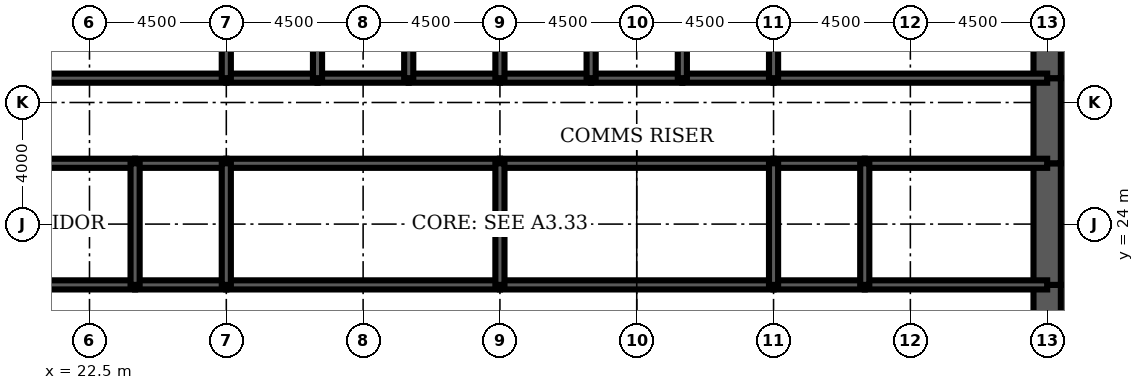
"""IFC4 building model, lengths in metres.
Left out: names, types, materials, properties, quantities, classifications, styles, units other than length and angle.
Written with IfcOpenShell. Run it as: python <this file> out.ifc"""

import sys

from ifc_helpers import new_model, si_unit, direction, frame, frame_2d, origin, place, context, subcontext, project, spatial, rectangle, extrude, element, fill, save


model = new_model("IFC4")
c1 = context("Model", 3, precision=1e-05, world=origin(), true_north=direction((0.0, 1.0)))
c2 = subcontext(c1, "Body", "Model", "MODEL_VIEW")
j1 = project(units=[si_unit("LENGTHUNIT", "METRE"), si_unit("PLANEANGLEUNIT", "RADIAN")], contexts=[c1])
p1 = place(None, origin())
s1 = spatial("IfcSite", under=j1, at=p1, CompositionType="ELEMENT")
p2 = place(p1, origin())
s2 = spatial("IfcBuilding", under=s1, at=p2, CompositionType="ELEMENT")
p3 = place(p2, frame((0.0, 0.0, 142.5)))
s3 = spatial("IfcBuildingStorey", under=s2, at=p3, CompositionType="ELEMENT", Elevation=142.5)
p4 = place(p3, frame((54.0, 19.2, 0.0), z_axis=(0.0, 0.0, 1.0), x_axis=(0.0, 1.0, 0.0)))
e1 = element("IfcWall", 1, at=p4, inside=s3, PredefinedType="SHEAR", context=c2, shape_type="SweptSolid", body=[
    extrude(rectangle(XDim=2.8, YDim=0.9, at=frame_2d((1.4, 0.0))), origin(), (0.0, 0.0, 1.0), 4.2),
])
p5 = place(p4, frame((0.4, 0.0, 0.0)))
e2 = element("IfcOpeningElement", 2, at=p5, cuts=e1, PredefinedType="OPENING", context=c2, shape_type="SweptSolid", body=[
    extrude(rectangle(XDim=1.8, YDim=2.1, at=frame_2d((0.9, 1.05))), frame((0.0, 0.46, 0.0), z_axis=(0.0, -1.0, 0.0), x_axis=(1.0, 0.0, 0.0)), (0.0, 0.0, 1.0), 0.92),
])
p6 = place(p3, frame((54.0, 22.0, 0.0), z_axis=(0.0, 0.0, 1.0), x_axis=(0.0, 1.0, 0.0)))
e3 = element("IfcWall", 3, at=p6, inside=s3, PredefinedType="SHEAR", context=c2, shape_type="SweptSolid", body=[
    extrude(rectangle(XDim=4.0, YDim=0.9, at=frame_2d((2.0, 0.0))), origin(), (0.0, 0.0, 1.0), 4.2),
])
p7 = place(p3, frame((54.0, 26.0, 0.0), z_axis=(0.0, 0.0, 1.0), x_axis=(0.0, 1.0, 0.0)))
e4 = element("IfcWall", 4, at=p7, inside=s3, PredefinedType="SHEAR", context=c2, shape_type="SweptSolid", body=[
    extrude(rectangle(XDim=2.8, YDim=0.9, at=frame_2d((1.4, 0.0))), origin(), (0.0, 0.0, 1.0), 4.2),
])
p8 = place(p7, frame((0.6, 0.0, 0.0)))
e5 = element("IfcOpeningElement", 5, at=p8, cuts=e4, PredefinedType="OPENING", context=c2, shape_type="SweptSolid", body=[
    extrude(rectangle(XDim=1.8, YDim=2.1, at=frame_2d((0.9, 1.05))), frame((0.0, 0.46, 0.0), z_axis=(0.0, -1.0, 0.0), x_axis=(1.0, 0.0, 0.0)), (0.0, 0.0, 1.0), 0.92),
])
p9 = place(p3, frame((54.0, 28.8, 0.0), z_axis=(0.0, 0.0, 1.0), x_axis=(0.0, 1.0, 0.0)))
e6 = element("IfcWall", 6, at=p9, inside=s3, PredefinedType="SHEAR", context=c2, shape_type="SweptSolid", body=[
    extrude(rectangle(XDim=3.2, YDim=0.9, at=frame_2d((1.6, 0.0))), origin(), (0.0, 0.0, 1.0), 4.2),
])
p10 = place(p3, frame((18.0, 28.8, 0.0), z_axis=(0.0, 0.0, 1.0), x_axis=(1.0, 0.0, 0.0)))
e7 = element("IfcWall", 7, at=p10, inside=s3, PredefinedType="SOLIDWALL", context=c2, shape_type="SweptSolid", body=[
    extrude(rectangle(XDim=9.0, YDim=0.3, at=frame_2d((4.5, 0.0))), origin(), (0.0, 0.0, 1.0), 4.2),
])
p11 = place(p10, frame((0.65, 0.0, 0.0)))
e8 = element("IfcOpeningElement", 8, at=p11, cuts=e7, PredefinedType="OPENING", context=c2, shape_type="SweptSolid", body=[
    extrude(rectangle(XDim=1.0, YDim=2.1, at=frame_2d((0.5, 1.05))), frame((0.0, 0.16, 0.0), z_axis=(0.0, -1.0, 0.0), x_axis=(1.0, 0.0, 0.0)), (0.0, 0.0, 1.0), 0.32),
])
p12 = place(p3, frame((27.0, 28.8, 0.0), z_axis=(0.0, 0.0, 1.0), x_axis=(1.0, 0.0, 0.0)))
e9 = element("IfcWall", 9, at=p12, inside=s3, PredefinedType="SOLIDWALL", context=c2, shape_type="SweptSolid", body=[
    extrude(rectangle(XDim=3.0, YDim=0.3, at=frame_2d((1.5, 0.0))), origin(), (0.0, 0.0, 1.0), 4.2),
])
p13 = place(p12, frame((0.95, 0.0, 0.0)))
e10 = element("IfcOpeningElement", 10, at=p13, cuts=e9, PredefinedType="OPENING", context=c2, shape_type="SweptSolid", body=[
    extrude(rectangle(XDim=1.1, YDim=2.2, at=frame_2d((0.55, 1.1))), frame((0.0, 0.16, 0.0), z_axis=(0.0, -1.0, 0.0), x_axis=(1.0, 0.0, 0.0)), (0.0, 0.0, 1.0), 0.32),
])
p14 = place(p3, frame((30.0, 28.8, 0.0), z_axis=(0.0, 0.0, 1.0), x_axis=(1.0, 0.0, 0.0)))
e11 = element("IfcWall", 11, at=p14, inside=s3, PredefinedType="SOLIDWALL", context=c2, shape_type="SweptSolid", body=[
    extrude(rectangle(XDim=3.0, YDim=0.3, at=frame_2d((1.5, 0.0))), origin(), (0.0, 0.0, 1.0), 4.2),
])
p15 = place(p14, frame((0.95, 0.0, 0.0)))
e12 = element("IfcOpeningElement", 12, at=p15, cuts=e11, PredefinedType="OPENING", context=c2, shape_type="SweptSolid", body=[
    extrude(rectangle(XDim=1.1, YDim=2.2, at=frame_2d((0.55, 1.1))), frame((0.0, 0.16, 0.0), z_axis=(0.0, -1.0, 0.0), x_axis=(1.0, 0.0, 0.0)), (0.0, 0.0, 1.0), 0.32),
])
p16 = place(p3, frame((33.0, 28.8, 0.0), z_axis=(0.0, 0.0, 1.0), x_axis=(1.0, 0.0, 0.0)))
e13 = element("IfcWall", 13, at=p16, inside=s3, PredefinedType="SOLIDWALL", context=c2, shape_type="SweptSolid", body=[
    extrude(rectangle(XDim=3.0, YDim=0.3, at=frame_2d((1.5, 0.0))), origin(), (0.0, 0.0, 1.0), 4.2),
])
p17 = place(p16, frame((0.95, 0.0, 0.0)))
e14 = element("IfcOpeningElement", 14, at=p17, cuts=e13, PredefinedType="OPENING", context=c2, shape_type="SweptSolid", body=[
    extrude(rectangle(XDim=1.1, YDim=2.2, at=frame_2d((0.55, 1.1))), frame((0.0, 0.16, 0.0), z_axis=(0.0, -1.0, 0.0), x_axis=(1.0, 0.0, 0.0)), (0.0, 0.0, 1.0), 0.32),
])
for number, where, z_axis, x_axis in (
    (15, (36.0, 28.8, 0.0), (0.0, 0.0, 1.0), (1.0, 0.0, 0.0)),
    (16, (39.0, 28.8, 0.0), (0.0, 0.0, 1.0), (1.0, 0.0, 0.0)),
):
    element("IfcWall", number, at=place(p3, frame(where, z_axis=z_axis, x_axis=x_axis)), inside=s3, PredefinedType="SOLIDWALL", context=c2, shape_type="SweptSolid", body=[
        extrude(rectangle(XDim=3.0, YDim=0.3, at=frame_2d((1.5, 0.0))), origin(), (0.0, 0.0, 1.0), 4.2),
    ])
p18 = place(p3, frame((42.0, 28.8, 0.0), z_axis=(0.0, 0.0, 1.0), x_axis=(1.0, 0.0, 0.0)))
e17 = element("IfcWall", 17, at=p18, inside=s3, PredefinedType="SOLIDWALL", context=c2, shape_type="SweptSolid", body=[
    extrude(rectangle(XDim=3.0, YDim=0.3, at=frame_2d((1.5, 0.0))), origin(), (0.0, 0.0, 1.0), 4.2),
])
p19 = place(p18, frame((0.95, 0.0, 0.0)))
e18 = element("IfcOpeningElement", 18, at=p19, cuts=e17, PredefinedType="OPENING", context=c2, shape_type="SweptSolid", body=[
    extrude(rectangle(XDim=1.1, YDim=2.2, at=frame_2d((0.55, 1.1))), frame((0.0, 0.16, 0.0), z_axis=(0.0, -1.0, 0.0), x_axis=(1.0, 0.0, 0.0)), (0.0, 0.0, 1.0), 0.32),
])
p20 = place(p3, frame((45.0, 28.8, 0.0), z_axis=(0.0, 0.0, 1.0), x_axis=(1.0, 0.0, 0.0)))
e19 = element("IfcWall", 19, at=p20, inside=s3, PredefinedType="SOLIDWALL", context=c2, shape_type="SweptSolid", body=[
    extrude(rectangle(XDim=9.0, YDim=0.3, at=frame_2d((4.5, 0.0))), origin(), (0.0, 0.0, 1.0), 4.2),
])
p21 = place(p20, frame((7.35, 0.0, 0.0)))
e20 = element("IfcOpeningElement", 20, at=p21, cuts=e19, PredefinedType="OPENING", context=c2, shape_type="SweptSolid", body=[
    extrude(rectangle(XDim=1.0, YDim=2.1, at=frame_2d((0.5, 1.05))), frame((0.0, 0.16, 0.0), z_axis=(0.0, -1.0, 0.0), x_axis=(1.0, 0.0, 0.0)), (0.0, 0.0, 1.0), 0.32),
])
p22 = place(p3, frame((18.0, 22.0, 0.0), z_axis=(0.0, 0.0, 1.0), x_axis=(1.0, 0.0, 0.0)))
e21 = element("IfcWall", 21, at=p22, inside=s3, PredefinedType="SOLIDWALL", context=c2, shape_type="SweptSolid", body=[
    extrude(rectangle(XDim=6.0, YDim=0.3, at=frame_2d((3.0, 0.0))), origin(), (0.0, 0.0, 1.0), 4.2),
])
p23 = place(p22, frame((2.0, 0.0, 0.0)))
e22 = element("IfcOpeningElement", 22, at=p23, cuts=e21, PredefinedType="OPENING", context=c2, shape_type="SweptSolid", body=[
    extrude(rectangle(XDim=1.0, YDim=2.1, at=frame_2d((0.5, 1.05))), frame((0.0, 0.16, 0.0), z_axis=(0.0, -1.0, 0.0), x_axis=(1.0, 0.0, 0.0)), (0.0, 0.0, 1.0), 0.32),
])
p24 = place(p3, frame((24.0, 22.0, 0.0), z_axis=(0.0, 0.0, 1.0), x_axis=(1.0, 0.0, 0.0)))
e23 = element("IfcWall", 23, at=p24, inside=s3, PredefinedType="SOLIDWALL", context=c2, shape_type="SweptSolid", body=[
    extrude(rectangle(XDim=3.0, YDim=0.3, at=frame_2d((1.5, 0.0))), origin(), (0.0, 0.0, 1.0), 4.2),
])
p25 = place(p24, frame((1.0, 0.0, 0.0)))
e24 = element("IfcOpeningElement", 24, at=p25, cuts=e23, PredefinedType="OPENING", context=c2, shape_type="SweptSolid", body=[
    extrude(rectangle(XDim=1.0, YDim=2.1, at=frame_2d((0.5, 1.05))), frame((0.0, 0.16, 0.0), z_axis=(0.0, -1.0, 0.0), x_axis=(1.0, 0.0, 0.0)), (0.0, 0.0, 1.0), 0.32),
])
p26 = place(p3, frame((27.0, 22.0, 0.0), z_axis=(0.0, 0.0, 1.0), x_axis=(1.0, 0.0, 0.0)))
e25 = element("IfcWall", 25, at=p26, inside=s3, PredefinedType="SOLIDWALL", context=c2, shape_type="SweptSolid", body=[
    extrude(rectangle(XDim=9.0, YDim=0.3, at=frame_2d((4.5, 0.0))), origin(), (0.0, 0.0, 1.0), 4.2),
])
p27 = place(p26, frame((4.0, 0.0, 0.0)))
e26 = element("IfcOpeningElement", 26, at=p27, cuts=e25, PredefinedType="OPENING", context=c2, shape_type="SweptSolid", body=[
    extrude(rectangle(XDim=1.0, YDim=2.1, at=frame_2d((0.5, 1.05))), frame((0.0, 0.16, 0.0), z_axis=(0.0, -1.0, 0.0), x_axis=(1.0, 0.0, 0.0)), (0.0, 0.0, 1.0), 0.32),
])
p28 = place(p3, frame((36.0, 22.0, 0.0), z_axis=(0.0, 0.0, 1.0), x_axis=(1.0, 0.0, 0.0)))
e27 = element("IfcWall", 27, at=p28, inside=s3, PredefinedType="SOLIDWALL", context=c2, shape_type="SweptSolid", body=[
    extrude(rectangle(XDim=9.0, YDim=0.3, at=frame_2d((4.5, 0.0))), origin(), (0.0, 0.0, 1.0), 4.2),
])
p29 = place(p28, frame((4.0, 0.0, 0.0)))
e28 = element("IfcOpeningElement", 28, at=p29, cuts=e27, PredefinedType="OPENING", context=c2, shape_type="SweptSolid", body=[
    extrude(rectangle(XDim=1.0, YDim=2.1, at=frame_2d((0.5, 1.05))), frame((0.0, 0.16, 0.0), z_axis=(0.0, -1.0, 0.0), x_axis=(1.0, 0.0, 0.0)), (0.0, 0.0, 1.0), 0.32),
])
p30 = place(p3, frame((45.0, 22.0, 0.0), z_axis=(0.0, 0.0, 1.0), x_axis=(1.0, 0.0, 0.0)))
e29 = element("IfcWall", 29, at=p30, inside=s3, PredefinedType="SOLIDWALL", context=c2, shape_type="SweptSolid", body=[
    extrude(rectangle(XDim=3.0, YDim=0.3, at=frame_2d((1.5, 0.0))), origin(), (0.0, 0.0, 1.0), 4.2),
])
p31 = place(p30, frame((1.0, 0.0, 0.0)))
e30 = element("IfcOpeningElement", 30, at=p31, cuts=e29, PredefinedType="OPENING", context=c2, shape_type="SweptSolid", body=[
    extrude(rectangle(XDim=1.0, YDim=2.1, at=frame_2d((0.5, 1.05))), frame((0.0, 0.16, 0.0), z_axis=(0.0, -1.0, 0.0), x_axis=(1.0, 0.0, 0.0)), (0.0, 0.0, 1.0), 0.32),
])
p32 = place(p3, frame((48.0, 22.0, 0.0), z_axis=(0.0, 0.0, 1.0), x_axis=(1.0, 0.0, 0.0)))
e31 = element("IfcWall", 31, at=p32, inside=s3, PredefinedType="SOLIDWALL", context=c2, shape_type="SweptSolid", body=[
    extrude(rectangle(XDim=6.0, YDim=0.3, at=frame_2d((3.0, 0.0))), origin(), (0.0, 0.0, 1.0), 4.2),
])
p33 = place(p32, frame((2.0, 0.0, 0.0)))
e32 = element("IfcOpeningElement", 32, at=p33, cuts=e31, PredefinedType="OPENING", context=c2, shape_type="SweptSolid", body=[
    extrude(rectangle(XDim=1.0, YDim=2.1, at=frame_2d((0.5, 1.05))), frame((0.0, 0.16, 0.0), z_axis=(0.0, -1.0, 0.0), x_axis=(1.0, 0.0, 0.0)), (0.0, 0.0, 1.0), 0.32),
])
p34 = place(p32, frame((4.3, 0.0, 0.0)))
e33 = element("IfcOpeningElement", 33, at=p34, cuts=e31, PredefinedType="OPENING", context=c2, shape_type="SweptSolid", body=[
    extrude(rectangle(XDim=1.0, YDim=2.1, at=frame_2d((0.5, 1.05))), frame((0.0, 0.16, 0.0), z_axis=(0.0, -1.0, 0.0), x_axis=(1.0, 0.0, 0.0)), (0.0, 0.0, 1.0), 0.32),
])
p35 = place(p3, frame((18.0, 26.0, 0.0), z_axis=(0.0, 0.0, 1.0), x_axis=(1.0, 0.0, 0.0)))
e34 = element("IfcWall", 34, at=p35, inside=s3, PredefinedType="SOLIDWALL", context=c2, shape_type="SweptSolid", body=[
    extrude(rectangle(XDim=6.0, YDim=0.3, at=frame_2d((3.0, 0.0))), origin(), (0.0, 0.0, 1.0), 4.2),
])
p36 = place(p3, frame((24.0, 26.0, 0.0), z_axis=(0.0, 0.0, 1.0), x_axis=(1.0, 0.0, 0.0)))
e35 = element("IfcWall", 35, at=p36, inside=s3, PredefinedType="SOLIDWALL", context=c2, shape_type="SweptSolid", body=[
    extrude(rectangle(XDim=3.0, YDim=0.3, at=frame_2d((1.5, 0.0))), origin(), (0.0, 0.0, 1.0), 4.2),
])
for number, where, z_axis, x_axis in (
    (36, (27.0, 26.0, 0.0), (0.0, 0.0, 1.0), (1.0, 0.0, 0.0)),
    (37, (36.0, 26.0, 0.0), (0.0, 0.0, 1.0), (1.0, 0.0, 0.0)),
):
    element("IfcWall", number, at=place(p3, frame(where, z_axis=z_axis, x_axis=x_axis)), inside=s3, PredefinedType="SOLIDWALL", context=c2, shape_type="SweptSolid", body=[
        extrude(rectangle(XDim=9.0, YDim=0.3, at=frame_2d((4.5, 0.0))), origin(), (0.0, 0.0, 1.0), 4.2),
    ])
p37 = place(p3, frame((45.0, 26.0, 0.0), z_axis=(0.0, 0.0, 1.0), x_axis=(1.0, 0.0, 0.0)))
e38 = element("IfcWall", 38, at=p37, inside=s3, PredefinedType="SOLIDWALL", context=c2, shape_type="SweptSolid", body=[
    extrude(rectangle(XDim=3.0, YDim=0.3, at=frame_2d((1.5, 0.0))), origin(), (0.0, 0.0, 1.0), 4.2),
])
p38 = place(p3, frame((48.0, 26.0, 0.0), z_axis=(0.0, 0.0, 1.0), x_axis=(1.0, 0.0, 0.0)))
e39 = element("IfcWall", 39, at=p38, inside=s3, PredefinedType="SOLIDWALL", context=c2, shape_type="SweptSolid", body=[
    extrude(rectangle(XDim=6.0, YDim=0.3, at=frame_2d((3.0, 0.0))), origin(), (0.0, 0.0, 1.0), 4.2),
])
for number, where, z_axis, x_axis in (
    (40, (27.0, 28.8, 0.0), (0.0, 0.0, 1.0), (0.0, 1.0, 0.0)),
    (41, (30.0, 28.8, 0.0), (0.0, 0.0, 1.0), (0.0, 1.0, 0.0)),
    (42, (33.0, 28.8, 0.0), (0.0, 0.0, 1.0), (0.0, 1.0, 0.0)),
    (43, (36.0, 28.8, 0.0), (0.0, 0.0, 1.0), (0.0, 1.0, 0.0)),
    (44, (39.0, 28.8, 0.0), (0.0, 0.0, 1.0), (0.0, 1.0, 0.0)),
    (45, (42.0, 28.8, 0.0), (0.0, 0.0, 1.0), (0.0, 1.0, 0.0)),
    (46, (45.0, 28.8, 0.0), (0.0, 0.0, 1.0), (0.0, 1.0, 0.0)),
):
    element("IfcWall", number, at=place(p3, frame(where, z_axis=z_axis, x_axis=x_axis)), inside=s3, PredefinedType="SOLIDWALL", context=c2, shape_type="SweptSolid", body=[
        extrude(rectangle(XDim=3.2, YDim=0.3, at=frame_2d((1.6, 0.0))), origin(), (0.0, 0.0, 1.0), 4.2),
    ])
for number, where, z_axis, x_axis in (
    (47, (24.0, 22.0, 0.0), (0.0, 0.0, 1.0), (0.0, 1.0, 0.0)),
    (48, (27.0, 22.0, 0.0), (0.0, 0.0, 1.0), (0.0, 1.0, 0.0)),
    (49, (36.0, 22.0, 0.0), (0.0, 0.0, 1.0), (0.0, 1.0, 0.0)),
    (50, (45.0, 22.0, 0.0), (0.0, 0.0, 1.0), (0.0, 1.0, 0.0)),
    (51, (48.0, 22.0, 0.0), (0.0, 0.0, 1.0), (0.0, 1.0, 0.0)),
):
    element("IfcWall", number, at=place(p3, frame(where, z_axis=z_axis, x_axis=x_axis)), inside=s3, PredefinedType="SOLIDWALL", context=c2, shape_type="SweptSolid", body=[
        extrude(rectangle(XDim=4.0, YDim=0.3, at=frame_2d((2.0, 0.0))), origin(), (0.0, 0.0, 1.0), 4.2),
    ])
p39 = place(p3, frame((38.5, 22.15, 0.0), z_axis=(0.0, 0.0, 1.0), x_axis=(0.0, 1.0, 0.0)))
e52 = element("IfcWall", 52, at=p39, inside=s3, PredefinedType="PARTITIONING", context=c2, shape_type="SweptSolid", body=[
    extrude(rectangle(XDim=3.7, YDim=0.15, at=frame_2d((1.85, 0.0))), origin(), (0.0, 0.0, 1.0), 3.0),
])
p40 = place(p39, frame((2.2, 0.0, 0.0)))
e53 = element("IfcOpeningElement", 53, at=p40, cuts=e52, PredefinedType="OPENING", context=c2, shape_type="SweptSolid", body=[
    extrude(rectangle(XDim=1.0, YDim=2.1, at=frame_2d((0.5, 1.05))), frame((0.0, 0.085, 0.0), z_axis=(0.0, -1.0, 0.0), x_axis=(1.0, 0.0, 0.0)), (0.0, 0.0, 1.0), 0.17),
])
p41 = place(p3, frame((51.975, 22.15, 0.0), z_axis=(0.0, 0.0, 1.0), x_axis=(0.0, 1.0, 0.0)))
e54 = element("IfcWall", 54, at=p41, inside=s3, PredefinedType="PARTITIONING", context=c2, shape_type="SweptSolid", body=[
    extrude(rectangle(XDim=3.7, YDim=0.15, at=frame_2d((1.85, 0.0))), origin(), (0.0, 0.0, 1.0), 3.0),
])
p42 = place(p3, frame((22.2, 26.15, 0.0), z_axis=(0.0, 0.0, 1.0), x_axis=(0.0, 1.0, 0.0)))
e55 = element("IfcWall", 55, at=p42, inside=s3, PredefinedType="PARTITIONING", context=c2, shape_type="SweptSolid", body=[
    extrude(rectangle(XDim=2.5, YDim=0.15, at=frame_2d((1.25, 0.0))), origin(), (0.0, 0.0, 1.0), 3.0),
])
p43 = place(p42, frame((0.35, 0.0, 0.0)))
e56 = element("IfcOpeningElement", 56, at=p43, cuts=e55, PredefinedType="OPENING", context=c2, shape_type="SweptSolid", body=[
    extrude(rectangle(XDim=1.0, YDim=2.1, at=frame_2d((0.5, 1.05))), frame((0.0, 0.085, 0.0), z_axis=(0.0, -1.0, 0.0), x_axis=(1.0, 0.0, 0.0)), (0.0, 0.0, 1.0), 0.17),
])
p44 = place(p40, origin())
e57 = element("IfcDoor", 57, at=p44, inside=s3, OperationType="SINGLE_SWING_RIGHT", PredefinedType="DOOR", context=c2, shape_type="SweptSolid", body=[
    extrude(rectangle(XDim=1.0, YDim=2.1, at=frame_2d((0.5, 1.05))), frame((0.0, 0.025, 0.0), z_axis=(0.0, -1.0, 0.0), x_axis=(1.0, 0.0, 0.0)), (0.0, 0.0, 1.0), 0.05),
])
fill(e53, e57)
p45 = place(p43, origin())
e58 = element("IfcDoor", 58, at=p45, inside=s3, OperationType="SINGLE_SWING_LEFT", PredefinedType="DOOR", context=c2, shape_type="SweptSolid", body=[
    extrude(rectangle(XDim=1.0, YDim=2.1, at=frame_2d((0.5, 1.05))), frame((0.0, 0.025, 0.0), z_axis=(0.0, -1.0, 0.0), x_axis=(1.0, 0.0, 0.0)), (0.0, 0.0, 1.0), 0.05),
])
fill(e56, e58)
p46 = place(p19, origin())
e59 = element("IfcDoor", 59, at=p46, inside=s3, OperationType="DOUBLE_DOOR_SLIDING", PredefinedType="USERDEFINED", context=c2, shape_type="SweptSolid", body=[
    extrude(rectangle(XDim=1.1, YDim=2.2, at=frame_2d((0.55, 1.1))), frame((0.0, 0.025, 0.0), z_axis=(0.0, -1.0, 0.0), x_axis=(1.0, 0.0, 0.0)), (0.0, 0.0, 1.0), 0.05),
])
fill(e18, e59)
p47 = place(p13, origin())
e60 = element("IfcDoor", 60, at=p47, inside=s3, OperationType="DOUBLE_DOOR_SLIDING", PredefinedType="USERDEFINED", context=c2, shape_type="SweptSolid", body=[
    extrude(rectangle(XDim=1.1, YDim=2.2, at=frame_2d((0.55, 1.1))), frame((0.0, 0.025, 0.0), z_axis=(0.0, -1.0, 0.0), x_axis=(1.0, 0.0, 0.0)), (0.0, 0.0, 1.0), 0.05),
])
fill(e10, e60)
p48 = place(p15, origin())
e61 = element("IfcDoor", 61, at=p48, inside=s3, OperationType="DOUBLE_DOOR_SLIDING", PredefinedType="USERDEFINED", context=c2, shape_type="SweptSolid", body=[
    extrude(rectangle(XDim=1.1, YDim=2.2, at=frame_2d((0.55, 1.1))), frame((0.0, 0.025, 0.0), z_axis=(0.0, -1.0, 0.0), x_axis=(1.0, 0.0, 0.0)), (0.0, 0.0, 1.0), 0.05),
])
fill(e12, e61)
p49 = place(p17, origin())
e62 = element("IfcDoor", 62, at=p49, inside=s3, OperationType="DOUBLE_DOOR_SLIDING", PredefinedType="USERDEFINED", context=c2, shape_type="SweptSolid", body=[
    extrude(rectangle(XDim=1.1, YDim=2.2, at=frame_2d((0.55, 1.1))), frame((0.0, 0.025, 0.0), z_axis=(0.0, -1.0, 0.0), x_axis=(1.0, 0.0, 0.0)), (0.0, 0.0, 1.0), 0.05),
])
fill(e14, e62)
p50 = place(p21, origin())
e63 = element("IfcDoor", 63, at=p50, inside=s3, OperationType="SINGLE_SWING_RIGHT", PredefinedType="DOOR", context=c2, shape_type="SweptSolid", body=[
    extrude(rectangle(XDim=1.0, YDim=2.1, at=frame_2d((0.5, 1.05))), frame((0.0, 0.025, 0.0), z_axis=(0.0, -1.0, 0.0), x_axis=(1.0, 0.0, 0.0)), (0.0, 0.0, 1.0), 0.05),
])
fill(e20, e63)
p51 = place(p5, origin())
e64 = element("IfcDoor", 64, at=p51, inside=s3, OperationType="SINGLE_SWING_LEFT", PredefinedType="DOOR", context=c2, shape_type="SweptSolid", body=[
    extrude(rectangle(XDim=1.8, YDim=2.1, at=frame_2d((0.9, 1.05))), frame((0.0, 0.45, 0.0), z_axis=(0.0, -1.0, 0.0), x_axis=(1.0, 0.0, 0.0)), (0.0, 0.0, 1.0), 0.899),
])
fill(e2, e64)
p52 = place(p8, origin())
e65 = element("IfcDoor", 65, at=p52, inside=s3, OperationType="SINGLE_SWING_LEFT", PredefinedType="DOOR", context=c2, shape_type="SweptSolid", body=[
    extrude(rectangle(XDim=1.8, YDim=2.1, at=frame_2d((0.9, 1.05))), frame((0.0, 0.45, 0.0), z_axis=(0.0, -1.0, 0.0), x_axis=(1.0, 0.0, 0.0)), (0.0, 0.0, 1.0), 0.899),
])
fill(e5, e65)
p53 = place(p25, origin())
e66 = element("IfcDoor", 66, at=p53, inside=s3, OperationType="SINGLE_SWING_LEFT", PredefinedType="DOOR", context=c2, shape_type="SweptSolid", body=[
    extrude(rectangle(XDim=1.0, YDim=2.1, at=frame_2d((0.5, 1.05))), frame((0.0, 0.025, 0.0), z_axis=(0.0, -1.0, 0.0), x_axis=(1.0, 0.0, 0.0)), (0.0, 0.0, 1.0), 0.05),
])
fill(e24, e66)
p54 = place(p27, origin())
e67 = element("IfcDoor", 67, at=p54, inside=s3, OperationType="SINGLE_SWING_LEFT", PredefinedType="DOOR", context=c2, shape_type="SweptSolid", body=[
    extrude(rectangle(XDim=1.0, YDim=2.1, at=frame_2d((0.5, 1.05))), frame((0.0, 0.025, 0.0), z_axis=(0.0, -1.0, 0.0), x_axis=(1.0, 0.0, 0.0)), (0.0, 0.0, 1.0), 0.05),
])
fill(e26, e67)
p55 = place(p29, origin())
e68 = element("IfcDoor", 68, at=p55, inside=s3, OperationType="SINGLE_SWING_LEFT", PredefinedType="DOOR", context=c2, shape_type="SweptSolid", body=[
    extrude(rectangle(XDim=1.0, YDim=2.1, at=frame_2d((0.5, 1.05))), frame((0.0, 0.025, 0.0), z_axis=(0.0, -1.0, 0.0), x_axis=(1.0, 0.0, 0.0)), (0.0, 0.0, 1.0), 0.05),
])
fill(e28, e68)
p56 = place(p31, origin())
e69 = element("IfcDoor", 69, at=p56, inside=s3, OperationType="SINGLE_SWING_LEFT", PredefinedType="DOOR", context=c2, shape_type="SweptSolid", body=[
    extrude(rectangle(XDim=1.0, YDim=2.1, at=frame_2d((0.5, 1.05))), frame((0.0, 0.025, 0.0), z_axis=(0.0, -1.0, 0.0), x_axis=(1.0, 0.0, 0.0)), (0.0, 0.0, 1.0), 0.05),
])
fill(e30, e69)
p57 = place(p33, origin())
e70 = element("IfcDoor", 70, at=p57, inside=s3, OperationType="SINGLE_SWING_LEFT", PredefinedType="DOOR", context=c2, shape_type="SweptSolid", body=[
    extrude(rectangle(XDim=1.0, YDim=2.1, at=frame_2d((0.5, 1.05))), frame((0.0, 0.025, 0.0), z_axis=(0.0, -1.0, 0.0), x_axis=(1.0, 0.0, 0.0)), (0.0, 0.0, 1.0), 0.05),
])
fill(e32, e70)
p58 = place(p34, origin())
e71 = element("IfcDoor", 71, at=p58, inside=s3, OperationType="SINGLE_SWING_RIGHT", PredefinedType="DOOR", context=c2, shape_type="SweptSolid", body=[
    extrude(rectangle(XDim=1.0, YDim=2.1, at=frame_2d((0.5, 1.05))), frame((0.0, 0.025, 0.0), z_axis=(0.0, -1.0, 0.0), x_axis=(1.0, 0.0, 0.0)), (0.0, 0.0, 1.0), 0.05),
])
fill(e33, e71)
save(model, sys.argv[1])
